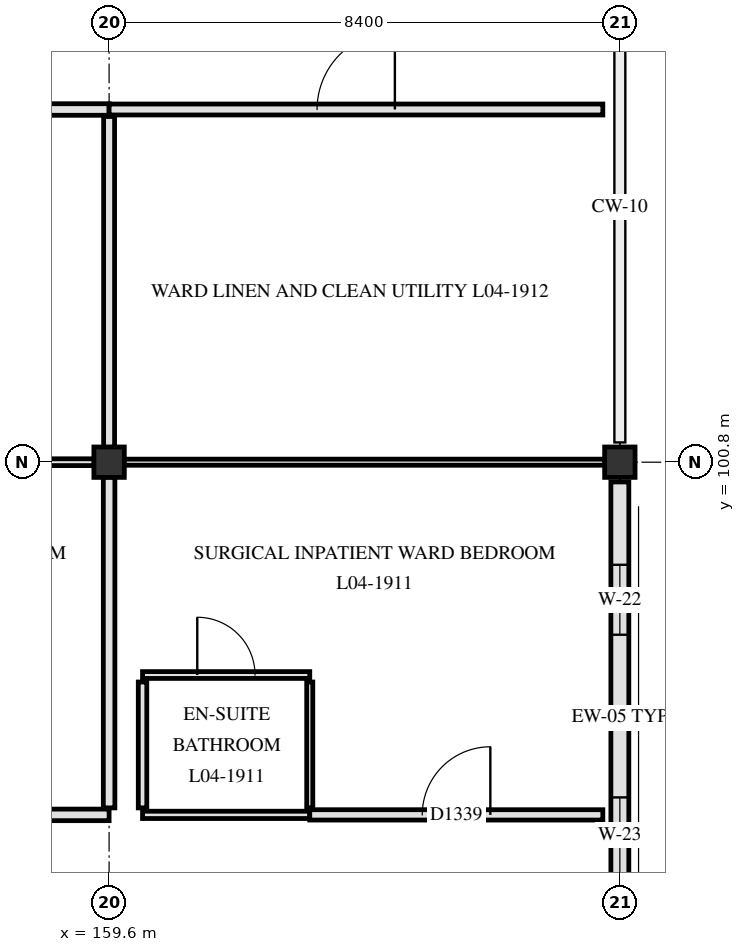
"""IFC4 building model, lengths in metres.
Left out: names, types, materials, properties, quantities, classifications, styles, units other than length and angle.
Written with IfcOpenShell. Run it as: python <this file> out.ifc"""

import sys

from ifc_helpers import new_model, si_unit, direction, frame, frame_2d, origin, origin_2d, place, context, subcontext, project, spatial, rectangle, extrude, element, fill, save


model = new_model("IFC4")
c1 = context("Model", 3, precision=1e-05, world=origin(), true_north=direction((0.0, 1.0)))
c2 = subcontext(c1, "Body", "Model", "MODEL_VIEW")
j1 = project(units=[si_unit("LENGTHUNIT", "METRE"), si_unit("PLANEANGLEUNIT", "RADIAN")], contexts=[c1])
p1 = place(None, origin())
s1 = spatial("IfcSite", under=j1, at=p1, CompositionType="ELEMENT")
p2 = place(p1, origin())
s2 = spatial("IfcBuilding", under=s1, at=p2, CompositionType="ELEMENT")
p3 = place(p2, frame((0.0, 0.0, 18.6)))
s3 = spatial("IfcBuildingStorey", under=s2, at=p3, CompositionType="ELEMENT", Elevation=18.6)
for number, where, z_axis, x_axis in (
    (1, (159.6, 100.8, 0.0), (0.0, 0.0, 1.0), (1.0, 0.0, 0.0)),
    (2, (168.0, 100.8, 0.0), (0.0, 0.0, 1.0), (1.0, 0.0, 0.0)),
):
    element("IfcColumn", number, at=place(p3, frame(where, z_axis=z_axis, x_axis=x_axis)), inside=s3, PredefinedType="COLUMN", context=c2, shape_type="SweptSolid", body=[
        extrude(rectangle(XDim=0.5, YDim=0.5, at=origin_2d()), origin(), (0.0, 0.0, 1.0), 3.9),
    ])
p4 = place(p3, frame((168.0, 100.475, 0.0), z_axis=(0.0, 0.0, 1.0), x_axis=(0.0, -1.0, 0.0)))
e3 = element("IfcWall", 3, at=p4, inside=s3, PredefinedType="SOLIDWALL", context=c2, shape_type="SweptSolid", body=[
    extrude(rectangle(XDim=7.75, YDim=0.295, at=frame_2d((3.875, 0.0))), origin(), (0.0, 0.0, 1.0), 3.3),
])
p5 = place(p4, frame((1.363, 0.0, 0.85)))
e4 = element("IfcOpeningElement", 4, at=p5, cuts=e3, PredefinedType="OPENING", context=c2, shape_type="SweptSolid", body=[
    extrude(rectangle(XDim=1.15, YDim=1.54, at=frame_2d((0.575, 0.77))), frame((0.0, 0.157, 0.0), z_axis=(0.0, -1.0, 0.0), x_axis=(1.0, 0.0, 0.0)), (0.0, 0.0, 1.0), 0.315),
])
p6 = place(p4, frame((5.188, 0.0, 0.85)))
e5 = element("IfcOpeningElement", 5, at=p6, cuts=e3, PredefinedType="OPENING", context=c2, shape_type="SweptSolid", body=[
    extrude(rectangle(XDim=1.25, YDim=1.54, at=frame_2d((0.625, 0.77))), frame((0.0, 0.157, 0.0), z_axis=(0.0, -1.0, 0.0), x_axis=(1.0, 0.0, 0.0)), (0.0, 0.0, 1.0), 0.315),
])
p7 = place(p3, frame((154.5, 95.0, 0.0), z_axis=(0.0, 0.0, 1.0), x_axis=(1.0, 0.0, 0.0)))
e6 = element("IfcWall", 6, at=p7, inside=s3, PredefinedType="PARTITIONING", context=c2, shape_type="SweptSolid", body=[
    extrude(rectangle(XDim=5.1, YDim=0.19, at=frame_2d((2.55, 0.0))), origin(), (0.0, 0.0, 1.0), 3.25),
])
p8 = place(p7, frame((1.78, 0.0, 0.0)))
e7 = element("IfcOpeningElement", 7, at=p8, cuts=e6, PredefinedType="OPENING", context=c2, shape_type="SweptSolid", body=[
    extrude(rectangle(XDim=1.54, YDim=2.24, at=frame_2d((0.77, 1.12))), frame((0.0, 0.105, 0.0), z_axis=(0.0, -1.0, 0.0), x_axis=(1.0, 0.0, 0.0)), (0.0, 0.0, 1.0), 0.21),
])
p9 = place(p3, frame((160.15, 95.0, 0.0), z_axis=(0.0, 0.0, 1.0), x_axis=(1.0, 0.0, 0.0)))
e8 = element("IfcWall", 8, at=p9, inside=s3, PredefinedType="PARTITIONING", context=c2, shape_type="SweptSolid", body=[
    extrude(rectangle(XDim=2.75, YDim=0.12, at=frame_2d((1.375, 0.0))), origin(), (0.0, 0.0, 1.0), 3.61),
])
p10 = place(p3, frame((162.9, 95.0, 0.0), z_axis=(0.0, 0.0, 1.0), x_axis=(1.0, 0.0, 0.0)))
e9 = element("IfcWall", 9, at=p10, inside=s3, PredefinedType="PARTITIONING", context=c2, shape_type="SweptSolid", body=[
    extrude(rectangle(XDim=4.82, YDim=0.17, at=frame_2d((2.41, 0.0))), origin(), (0.0, 0.0, 1.0), 3.61),
])
p11 = place(p10, frame((1.85, 0.0, 0.0)))
e10 = element("IfcOpeningElement", 10, at=p11, cuts=e9, PredefinedType="OPENING", context=c2, shape_type="SweptSolid", body=[
    extrude(rectangle(XDim=1.12, YDim=2.18, at=frame_2d((0.56, 1.09))), frame((0.0, 0.095, 0.0), z_axis=(0.0, -1.0, 0.0), x_axis=(1.0, 0.0, 0.0)), (0.0, 0.0, 1.0), 0.19),
])
p12 = place(p3, frame((160.15, 97.3, 0.0), z_axis=(0.0, 0.0, 1.0), x_axis=(1.0, 0.0, 0.0)))
e11 = element("IfcWall", 11, at=p12, inside=s3, PredefinedType="PARTITIONING", context=c2, shape_type="SweptSolid", body=[
    extrude(rectangle(XDim=2.75, YDim=0.112, at=frame_2d((1.375, 0.0))), origin(), (0.0, 0.0, 1.0), 3.61),
])
p13 = place(p12, frame((0.9, 0.0, 0.0)))
e12 = element("IfcOpeningElement", 12, at=p13, cuts=e11, PredefinedType="OPENING", context=c2, shape_type="SweptSolid", body=[
    extrude(rectangle(XDim=0.95, YDim=2.1, at=frame_2d((0.475, 1.05))), frame((0.0, 0.066, 0.0), z_axis=(0.0, -1.0, 0.0), x_axis=(1.0, 0.0, 0.0)), (0.0, 0.0, 1.0), 0.132),
])
p14 = place(p3, frame((151.495, 100.8, 0.0), z_axis=(0.0, 0.0, 1.0), x_axis=(1.0, 0.0, 0.0)))
e13 = element("IfcWall", 13, at=p14, inside=s3, PredefinedType="PARTITIONING", context=c2, shape_type="SweptSolid", body=[
    extrude(rectangle(XDim=7.86, YDim=0.112, at=frame_2d((3.93, 0.0))), origin(), (0.0, 0.0, 1.0), 3.16),
])
p15 = place(p3, frame((159.845, 100.8, 0.0), z_axis=(0.0, 0.0, 1.0), x_axis=(1.0, 0.0, 0.0)))
e14 = element("IfcWall", 14, at=p15, inside=s3, PredefinedType="PARTITIONING", context=c2, shape_type="SweptSolid", body=[
    extrude(rectangle(XDim=7.91, YDim=0.1, at=frame_2d((3.955, 0.0))), origin(), (0.0, 0.0, 1.0), 3.15),
])
p16 = place(p3, frame((151.2, 106.6, 0.0), z_axis=(0.0, 0.0, 1.0), x_axis=(1.0, 0.0, 0.0)))
e15 = element("IfcWall", 15, at=p16, inside=s3, PredefinedType="PARTITIONING", context=c2, shape_type="SweptSolid", body=[
    extrude(rectangle(XDim=8.4, YDim=0.19, at=frame_2d((4.2, 0.0))), origin(), (0.0, 0.0, 1.0), 3.25),
])
p17 = place(p16, frame((3.33, 0.0, 0.0)))
e16 = element("IfcOpeningElement", 16, at=p17, cuts=e15, PredefinedType="OPENING", context=c2, shape_type="SweptSolid", body=[
    extrude(rectangle(XDim=1.74, YDim=2.24, at=frame_2d((0.87, 1.12))), frame((0.0, 0.105, 0.0), z_axis=(0.0, -1.0, 0.0), x_axis=(1.0, 0.0, 0.0)), (0.0, 0.0, 1.0), 0.21),
])
p18 = place(p3, frame((159.6, 106.6, 0.0), z_axis=(0.0, 0.0, 1.0), x_axis=(1.0, 0.0, 0.0)))
e17 = element("IfcWall", 17, at=p18, inside=s3, PredefinedType="PARTITIONING", context=c2, shape_type="SweptSolid", body=[
    extrude(rectangle(XDim=8.12, YDim=0.18, at=frame_2d((4.06, 0.0))), origin(), (0.0, 0.0, 1.0), 3.25),
])
p19 = place(p18, frame((3.42, 0.0, 0.0)))
e18 = element("IfcOpeningElement", 18, at=p19, cuts=e17, PredefinedType="OPENING", context=c2, shape_type="SweptSolid", body=[
    extrude(rectangle(XDim=1.28, YDim=2.18, at=frame_2d((0.64, 1.09))), frame((0.0, 0.1, 0.0), z_axis=(0.0, -1.0, 0.0), x_axis=(1.0, 0.0, 0.0)), (0.0, 0.0, 1.0), 0.2),
])
p20 = place(p3, frame((159.6, 95.115, 0.0), z_axis=(0.0, 0.0, 1.0), x_axis=(0.0, 1.0, 0.0)))
e19 = element("IfcWall", 19, at=p20, inside=s3, PredefinedType="PARTITIONING", context=c2, shape_type="SweptSolid", body=[
    extrude(rectangle(XDim=5.44, YDim=0.19, at=frame_2d((2.72, 0.0))), origin(), (0.0, 0.0, 1.0), 3.25),
])
p21 = place(p3, frame((159.6, 101.045, 0.0), z_axis=(0.0, 0.0, 1.0), x_axis=(0.0, 1.0, 0.0)))
e20 = element("IfcWall", 20, at=p21, inside=s3, PredefinedType="PARTITIONING", context=c2, shape_type="SweptSolid", body=[
    extrude(rectangle(XDim=5.44, YDim=0.18, at=frame_2d((2.72, 0.0))), origin(), (0.0, 0.0, 1.0), 3.25),
])
p22 = place(p3, frame((160.15, 95.115, 0.0), z_axis=(0.0, 0.0, 1.0), x_axis=(0.0, 1.0, 0.0)))
e21 = element("IfcWall", 21, at=p22, inside=s3, PredefinedType="PARTITIONING", context=c2, shape_type="SweptSolid", body=[
    extrude(rectangle(XDim=2.07, YDim=0.14, at=frame_2d((1.035, 0.0))), origin(), (0.0, 0.0, 1.0), 3.3),
])
p23 = place(p3, frame((162.9, 95.115, 0.0), z_axis=(0.0, 0.0, 1.0), x_axis=(0.0, 1.0, 0.0)))
e22 = element("IfcWall", 22, at=p23, inside=s3, PredefinedType="PARTITIONING", context=c2, shape_type="SweptSolid", body=[
    extrude(rectangle(XDim=2.07, YDim=0.1, at=frame_2d((1.035, 0.0))), origin(), (0.0, 0.0, 1.0), 3.3),
])
p24 = place(p5, origin())
e23 = element("IfcWindow", 23, at=p24, inside=s3, PartitioningType="SINGLE_PANEL", PredefinedType="WINDOW", context=c2, shape_type="SweptSolid", body=[
    extrude(rectangle(XDim=1.15, YDim=1.54, at=frame_2d((0.575, 0.77))), frame((0.0, 0.03, 0.0), z_axis=(0.0, -1.0, 0.0), x_axis=(1.0, 0.0, 0.0)), (0.0, 0.0, 1.0), 0.06),
])
fill(e4, e23)
p25 = place(p6, origin())
e24 = element("IfcWindow", 24, at=p25, inside=s3, PartitioningType="SINGLE_PANEL", PredefinedType="WINDOW", context=c2, shape_type="SweptSolid", body=[
    extrude(rectangle(XDim=1.25, YDim=1.54, at=frame_2d((0.625, 0.77))), frame((0.0, 0.03, 0.0), z_axis=(0.0, -1.0, 0.0), x_axis=(1.0, 0.0, 0.0)), (0.0, 0.0, 1.0), 0.06),
])
fill(e5, e24)
p26 = place(p11, origin())
e25 = element("IfcDoor", 25, at=p26, inside=s3, OperationType="SINGLE_SWING_RIGHT", PredefinedType="DOOR", context=c2, shape_type="SweptSolid", body=[
    extrude(rectangle(XDim=1.12, YDim=2.18, at=frame_2d((0.56, 1.09))), frame((0.0, 0.025, 0.0), z_axis=(0.0, -1.0, 0.0), x_axis=(1.0, 0.0, 0.0)), (0.0, 0.0, 1.0), 0.05),
])
fill(e10, e25)
p27 = place(p13, origin())
e26 = element("IfcDoor", 26, at=p27, inside=s3, OperationType="SINGLE_SWING_LEFT", PredefinedType="DOOR", context=c2, shape_type="SweptSolid", body=[
    extrude(rectangle(XDim=0.95, YDim=2.1, at=frame_2d((0.475, 1.05))), frame((0.0, 0.025, 0.0), z_axis=(0.0, -1.0, 0.0), x_axis=(1.0, 0.0, 0.0)), (0.0, 0.0, 1.0), 0.05),
])
fill(e12, e26)
p28 = place(p19, origin())
e27 = element("IfcDoor", 27, at=p28, inside=s3, OperationType="SINGLE_SWING_RIGHT", PredefinedType="DOOR", context=c2, shape_type="SweptSolid", body=[
    extrude(rectangle(XDim=1.28, YDim=2.18, at=frame_2d((0.64, 1.09))), frame((0.0, 0.025, 0.0), z_axis=(0.0, -1.0, 0.0), x_axis=(1.0, 0.0, 0.0)), (0.0, 0.0, 1.0), 0.05),
])
fill(e18, e27)
save(model, sys.argv[1])
